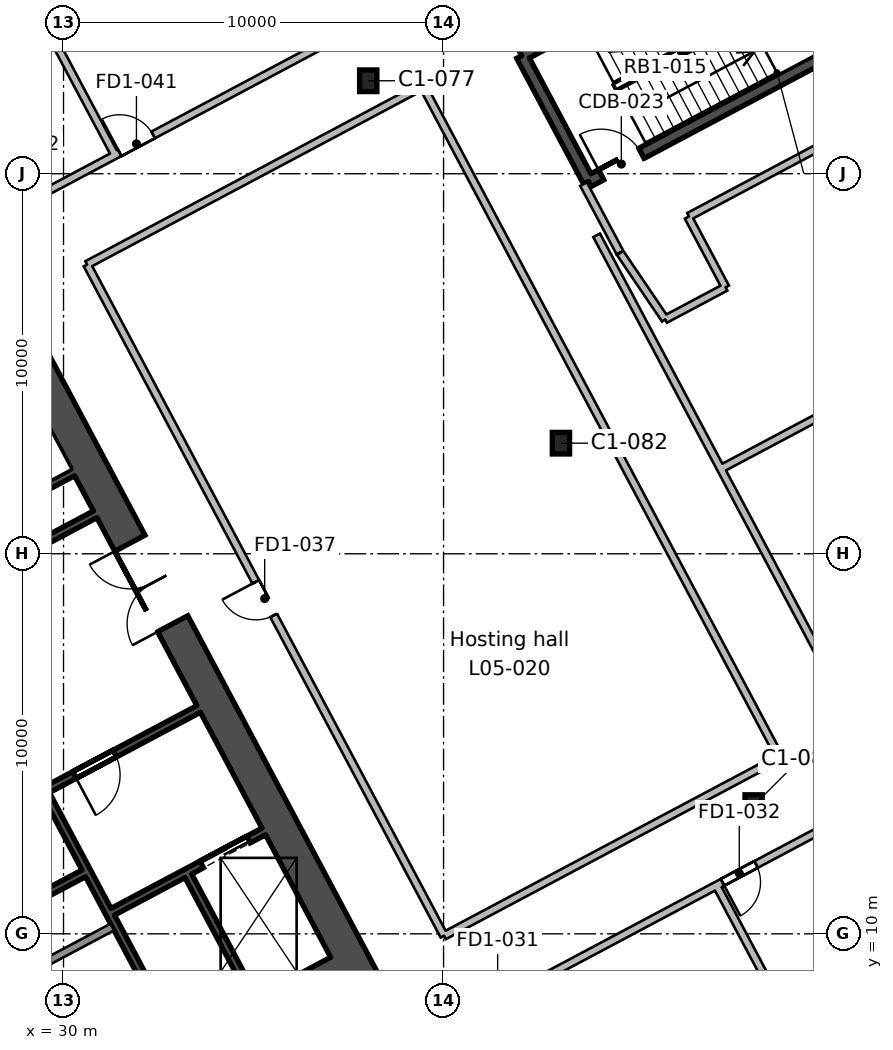
"""IFC4 building model, lengths in metres.
Left out: names, types, materials, properties, quantities, classifications, styles, units other than length and angle.
Written with IfcOpenShell. Run it as: python <this file> out.ifc"""

import sys

from ifc_helpers import new_model, si_unit, direction, frame, frame_2d, origin, origin_2d, place, context, subcontext, project, spatial, rectangle, i_section, extrude, element, fill, save


model = new_model("IFC4")
c1 = context("Model", 3, precision=1e-05, world=origin(), true_north=direction((0.0, 1.0)))
c2 = subcontext(c1, "Body", "Model", "MODEL_VIEW")
j1 = project(units=[si_unit("LENGTHUNIT", "METRE"), si_unit("PLANEANGLEUNIT", "RADIAN")], contexts=[c1])
p1 = place(None, origin())
s1 = spatial("IfcSite", under=j1, at=p1, CompositionType="ELEMENT")
p2 = place(p1, origin())
s2 = spatial("IfcBuilding", under=s1, at=p2, CompositionType="ELEMENT")
p3 = place(p2, frame((0.0, 0.0, 28.4)))
s3 = spatial("IfcBuildingStorey", under=s2, at=p3, CompositionType="ELEMENT", Elevation=28.4)
for number, where, z_axis, x_axis in (
    (1, (48.158, 13.374, 0.0), (0.0, 0.0, 1.0), (1.0, 0.0, 0.0)),
    (2, (43.088, 22.91, 0.0), (0.0, 0.0, 1.0), (1.0, 0.0, 0.0)),
    (3, (38.018, 32.446, 0.0), (0.0, 0.0, 1.0), (1.0, 0.0, 0.0)),
):
    element("IfcColumn", number, at=place(p3, frame(where, z_axis=z_axis, x_axis=x_axis)), inside=s3, PredefinedType="COLUMN", context=c2, shape_type="SweptSolid", body=[
        extrude(i_section(OverallWidth=0.455, OverallDepth=0.569, WebThickness=0.078, FlangeThickness=0.125, FilletRadius=0.015, at=origin_2d()), origin(), (0.0, 0.0, 1.0), 5.4),
    ])
p4 = place(p3, frame((37.849, 8.799, 0.0), z_axis=(0.0, 0.0, 1.0), x_axis=(-0.469465789982, 0.882950662289, 0.0)))
e4 = element("IfcWall", 4, at=p4, inside=s3, PredefinedType="SHEAR", context=c2, shape_type="SweptSolid", body=[
    extrude(rectangle(XDim=20.0, YDim=0.9, at=frame_2d((10.0, 0.0))), origin(), (0.0, 0.0, 1.0), 5.4),
])
p5 = place(p4, frame((10.6, 0.0, 0.0)))
e5 = element("IfcOpeningElement", 5, at=p5, cuts=e4, PredefinedType="OPENING", context=c2, shape_type="SweptSolid", body=[
    extrude(rectangle(XDim=2.4, YDim=2.4, at=frame_2d((1.2, 1.2))), frame((0.0, 0.46, 0.0), z_axis=(0.0, -1.0, 0.0), x_axis=(1.0, 0.0, 0.0)), (0.0, 0.0, 1.0), 0.92),
])
p6 = place(p3, frame((19.405, -0.498, 0.0), z_axis=(0.0, 0.0, 1.0), x_axis=(0.88294509198, 0.469476266226, 0.0)))
e6 = element("IfcWall", 6, at=p6, inside=s3, PredefinedType="SHEAR", context=c2, shape_type="SweptSolid", body=[
    extrude(rectangle(XDim=20.2, YDim=0.9, at=frame_2d((10.1, 0.0))), origin(), (0.0, 0.0, 1.0), 5.4),
])
p7 = place(p3, frame((32.968, 7.223, 0.0), z_axis=(0.0, 0.0, 1.0), x_axis=(-0.469480409012, 0.88294288918, 0.0)))
e7 = element("IfcWall", 7, at=p7, inside=s3, PredefinedType="SHEAR", context=c2, shape_type="SweptSolid", body=[
    extrude(rectangle(XDim=7.3, YDim=0.2, at=frame_2d((3.65, 0.0))), origin(), (0.0, 0.0, 1.0), 5.4),
])
p8 = place(p3, frame((34.999, 8.303, 0.0), z_axis=(0.0, 0.0, 1.0), x_axis=(-0.4694665462, 0.882950260207, 0.0)))
e8 = element("IfcWall", 8, at=p8, inside=s3, PredefinedType="SHEAR", context=c2, shape_type="SweptSolid", body=[
    extrude(rectangle(XDim=3.65, YDim=0.2, at=frame_2d((1.825, 0.0))), origin(), (0.0, 0.0, 1.0), 5.4),
])
p9 = place(p3, frame((26.692, 7.737, 0.0), z_axis=(0.0, 0.0, 1.0), x_axis=(0.882953967957, 0.469459572775, 0.0)))
e9 = element("IfcWall", 9, at=p9, inside=s3, PredefinedType="SOLIDWALL", context=c2, shape_type="SweptSolid", body=[
    extrude(rectangle(XDim=5.2, YDim=0.2, at=frame_2d((2.6, 0.0))), origin(), (0.0, 0.0, 1.0), 5.4),
])
p10 = place(p3, frame((31.296, 10.581, 0.0), z_axis=(0.0, 0.0, 1.0), x_axis=(0.882960433586, 0.469447412093, 0.0)))
e10 = element("IfcWall", 10, at=p10, inside=s3, PredefinedType="SHEAR", context=c2, shape_type="SweptSolid", body=[
    extrude(rectangle(XDim=4.5, YDim=0.2, at=frame_2d((2.25, 0.0))), origin(), (0.0, 0.0, 1.0), 5.4),
])
p11 = place(p10, frame((2.65, 0.0, 0.0)))
e11 = element("IfcOpeningElement", 11, at=p11, cuts=e10, PredefinedType="OPENING", context=c2, shape_type="SweptSolid", body=[
    extrude(rectangle(XDim=1.4, YDim=2.4, at=frame_2d((0.7, 1.2))), frame((0.0, 0.11, 0.0), z_axis=(0.0, -1.0, 0.0), x_axis=(1.0, 0.0, 0.0)), (0.0, 0.0, 1.0), 0.22),
])
p12 = place(p3, frame((25.941, 9.15, 0.0), z_axis=(0.0, 0.0, 1.0), x_axis=(0.882953967957, 0.469459572775, 0.0)))
e12 = element("IfcWall", 12, at=p12, inside=s3, PredefinedType="SHEAR", context=c2, shape_type="SweptSolid", body=[
    extrude(rectangle(XDim=5.2, YDim=0.2, at=frame_2d((2.6, 0.0))), origin(), (0.0, 0.0, 1.0), 5.4),
])
p13 = place(p3, frame((24.726, 11.222, 0.0), z_axis=(0.0, 0.0, 1.0), x_axis=(0.882940221191, 0.469485426614, 0.0)))
e13 = element("IfcWall", 13, at=p13, inside=s3, PredefinedType="SHEAR", context=c2, shape_type="SweptSolid", body=[
    extrude(rectangle(XDim=10.0, YDim=0.2, at=frame_2d((5.0, 0.0))), origin(), (0.0, 0.0, 1.0), 5.4),
])
p14 = place(p13, frame((6.3, 0.0, 0.0)))
e14 = element("IfcOpeningElement", 14, at=p14, cuts=e13, PredefinedType="OPENING", context=c2, shape_type="SweptSolid", body=[
    extrude(rectangle(XDim=1.2, YDim=2.1, at=frame_2d((0.6, 1.05))), frame((0.0, 0.11, 0.0), z_axis=(0.0, -1.0, 0.0), x_axis=(1.0, 0.0, 0.0)), (0.0, 0.0, 1.0), 0.22),
])
p15 = place(p13, frame((2.25, 0.0, 0.0)))
e15 = element("IfcOpeningElement", 15, at=p15, cuts=e13, PredefinedType="OPENING", context=c2, shape_type="SweptSolid", body=[
    extrude(rectangle(XDim=0.9, YDim=2.1, at=frame_2d((0.45, 1.05))), frame((0.0, 0.11, 0.0), z_axis=(0.0, -1.0, 0.0), x_axis=(1.0, 0.0, 0.0)), (0.0, 0.0, 1.0), 0.22),
])
p16 = place(p3, frame((23.769, 17.282, 0.0), z_axis=(0.0, 0.0, 1.0), x_axis=(0.882940221191, 0.469485426614, 0.0)))
e16 = element("IfcWall", 16, at=p16, inside=s3, PredefinedType="SHEAR", context=c2, shape_type="SweptSolid", body=[
    extrude(rectangle(XDim=8.0, YDim=0.2, at=frame_2d((4.0, 0.0))), origin(), (0.0, 0.0, 1.0), 5.4),
])
p17 = place(p3, frame((23.182, 18.385, 0.0), z_axis=(0.0, 0.0, 1.0), x_axis=(0.88295287151, 0.469461634952, 0.0)))
e17 = element("IfcWall", 17, at=p17, inside=s3, PredefinedType="SHEAR", context=c2, shape_type="SweptSolid", body=[
    extrude(rectangle(XDim=8.0, YDim=0.2, at=frame_2d((4.0, 0.0))), origin(), (0.0, 0.0, 1.0), 5.4),
])
p18 = place(p3, frame((51.145, 33.693, 0.0), z_axis=(0.0, 0.0, 1.0), x_axis=(-0.882945809314, -0.469474917132, 0.0)))
e18 = element("IfcWall", 18, at=p18, inside=s3, PredefinedType="SHEAR", context=c2, shape_type="SweptSolid", body=[
    extrude(rectangle(XDim=8.3, YDim=0.3, at=frame_2d((4.15, 0.0))), origin(), (0.0, 0.0, 1.0), 5.4),
])
p19 = place(p18, frame((6.725, 0.0, 0.0)))
e19 = element("IfcOpeningElement", 19, at=p19, cuts=e18, PredefinedType="OPENING", context=c2, shape_type="SweptSolid", body=[
    extrude(rectangle(XDim=1.2, YDim=2.1, at=frame_2d((0.6, 1.05))), frame((0.0, 0.16, 0.0), z_axis=(0.0, -1.0, 0.0), x_axis=(1.0, 0.0, 0.0)), (0.0, 0.0, 1.0), 0.32),
])
p20 = place(p3, frame((43.816, 29.796, 0.0), z_axis=(0.0, 0.0, 1.0), x_axis=(-0.46946936446, 0.882948761726, 0.0)))
e20 = element("IfcWall", 20, at=p20, inside=s3, PredefinedType="SHEAR", context=c2, shape_type="SweptSolid", body=[
    extrude(rectangle(XDim=3.75, YDim=0.3, at=frame_2d((1.875, 0.0))), origin(), (0.0, 0.0, 1.0), 5.4),
])
p21 = place(p3, frame((42.055, 33.107, 0.0), z_axis=(0.0, 0.0, 1.0), x_axis=(0.882945809314, 0.469474917132, 0.0)))
e21 = element("IfcWall", 21, at=p21, inside=s3, PredefinedType="SHEAR", context=c2, shape_type="SweptSolid", body=[
    extrude(rectangle(XDim=8.3, YDim=0.3, at=frame_2d((4.15, 0.0))), origin(), (0.0, 0.0, 1.0), 5.4),
])
p22 = place(p3, frame((0.0, 13.815, 0.0), z_axis=(0.0, 0.0, 1.0), x_axis=(0.882946053005, 0.469474458819, 0.0)))
e22 = element("IfcWall", 22, at=p22, inside=s3, PredefinedType="PARTITIONING", context=c2, shape_type="SweptSolid", body=[
    extrude(rectangle(XDim=65.714, YDim=0.2, at=frame_2d((32.857, 0.0))), origin(), (0.0, 0.0, 1.0), 4.95),
])
p23 = place(p22, frame((35.65, 0.0, 0.0)))
e23 = element("IfcOpeningElement", 23, at=p23, cuts=e22, PredefinedType="OPENING", context=c2, shape_type="SweptSolid", body=[
    extrude(rectangle(XDim=1.0, YDim=2.1, at=frame_2d((0.5, 1.05))), frame((0.0, 0.11, 0.0), z_axis=(0.0, -1.0, 0.0), x_axis=(1.0, 0.0, 0.0)), (0.0, 0.0, 1.0), 0.22),
])
p24 = place(p22, frame((32.15, 0.0, 0.0)))
e24 = element("IfcOpeningElement", 24, at=p24, cuts=e22, PredefinedType="OPENING", context=c2, shape_type="SweptSolid", body=[
    extrude(rectangle(XDim=1.0, YDim=2.1, at=frame_2d((0.5, 1.05))), frame((0.0, 0.11, 0.0), z_axis=(0.0, -1.0, 0.0), x_axis=(1.0, 0.0, 0.0)), (0.0, 0.0, 1.0), 0.22),
])
p25 = place(p22, frame((19.25, 0.0, 0.0)))
e25 = element("IfcOpeningElement", 25, at=p25, cuts=e22, PredefinedType="OPENING", context=c2, shape_type="SweptSolid", body=[
    extrude(rectangle(XDim=1.0, YDim=2.1, at=frame_2d((0.5, 1.05))), frame((0.0, 0.11, 0.0), z_axis=(0.0, -1.0, 0.0), x_axis=(1.0, 0.0, 0.0)), (0.0, 0.0, 1.0), 0.22),
])
p26 = place(p3, frame((69.475, 23.126, 0.0), z_axis=(0.0, 0.0, 1.0), x_axis=(-0.882944287046, -0.469477780063, 0.0)))
e26 = element("IfcWall", 26, at=p26, inside=s3, PredefinedType="PARTITIONING", context=c2, shape_type="SweptSolid", body=[
    extrude(rectangle(XDim=63.285, YDim=0.2, at=frame_2d((31.643, 0.0))), origin(), (0.0, 0.0, 1.0), 4.95),
])
p27 = place(p26, frame((47.47, 0.0, 0.0)))
e27 = element("IfcOpeningElement", 27, at=p27, cuts=e26, PredefinedType="OPENING", context=c2, shape_type="SweptSolid", body=[
    extrude(rectangle(XDim=1.0, YDim=2.1, at=frame_2d((0.5, 1.05))), frame((0.0, 0.11, 0.0), z_axis=(0.0, -1.0, 0.0), x_axis=(1.0, 0.0, 0.0)), (0.0, 0.0, 1.0), 0.22),
])
p28 = place(p26, frame((31.271, 0.0, 0.0)))
e28 = element("IfcOpeningElement", 28, at=p28, cuts=e26, PredefinedType="OPENING", context=c2, shape_type="SweptSolid", body=[
    extrude(rectangle(XDim=1.0, YDim=2.1, at=frame_2d((0.5, 1.05))), frame((0.0, 0.11, 0.0), z_axis=(0.0, -1.0, 0.0), x_axis=(1.0, 0.0, 0.0)), (0.0, 0.0, 1.0), 0.22),
])
p29 = place(p26, frame((24.07, 0.0, 0.0)))
e29 = element("IfcOpeningElement", 29, at=p29, cuts=e26, PredefinedType="OPENING", context=c2, shape_type="SweptSolid", body=[
    extrude(rectangle(XDim=1.0, YDim=2.1, at=frame_2d((0.5, 1.05))), frame((0.0, 0.11, 0.0), z_axis=(0.0, -1.0, 0.0), x_axis=(1.0, 0.0, 0.0)), (0.0, 0.0, 1.0), 0.22),
])
p30 = place(p26, frame((11.071, 0.0, 0.0)))
e30 = element("IfcOpeningElement", 30, at=p30, cuts=e26, PredefinedType="OPENING", context=c2, shape_type="SweptSolid", body=[
    extrude(rectangle(XDim=1.0, YDim=2.1, at=frame_2d((0.5, 1.05))), frame((0.0, 0.11, 0.0), z_axis=(0.0, -1.0, 0.0), x_axis=(1.0, 0.0, 0.0)), (0.0, 0.0, 1.0), 0.22),
])
p31 = place(p3, frame((30.307, 32.462, 0.0), z_axis=(0.0, 0.0, 1.0), x_axis=(0.469652813312, -0.882851196379, 0.0)))
e31 = element("IfcWall", 31, at=p31, inside=s3, PredefinedType="PARTITIONING", context=c2, shape_type="SweptSolid", body=[
    extrude(rectangle(XDim=2.236, YDim=0.2, at=frame_2d((1.118, 0.0))), origin(), (0.0, 0.0, 1.0), 4.95),
])
p32 = place(p3, frame((30.307, 32.462, 0.0), z_axis=(0.0, 0.0, 1.0), x_axis=(-0.469337071246, 0.883019090141, 0.0)))
e32 = element("IfcWall", 32, at=p32, inside=s3, PredefinedType="PARTITIONING", context=c2, shape_type="SweptSolid", body=[
    extrude(rectangle(XDim=3.566, YDim=0.2, at=frame_2d((1.783, 0.0))), origin(), (0.0, 0.0, 1.0), 4.95),
])
p33 = place(p3, frame((47.183, 11.272, 0.0), z_axis=(0.0, 0.0, 1.0), x_axis=(0.469454635748, -0.882956592916, 0.0)))
e33 = element("IfcWall", 33, at=p33, inside=s3, PredefinedType="PARTITIONING", context=c2, shape_type="SweptSolid", body=[
    extrude(rectangle(XDim=9.001, YDim=0.2, at=frame_2d((4.501, 0.0))), origin(), (0.0, 0.0, 1.0), 4.95),
])
p34 = place(p3, frame((44.028, 28.38, 0.0), z_axis=(0.0, 0.0, 1.0), x_axis=(0.469474817112, -0.882945862495, 0.0)))
e34 = element("IfcWall", 34, at=p34, inside=s3, PredefinedType="PARTITIONING", context=c2, shape_type="SweptSolid", body=[
    extrude(rectangle(XDim=14.39, YDim=0.2, at=frame_2d((7.195, 0.0))), origin(), (0.0, 0.0, 1.0), 4.95),
])
p35 = place(p3, frame((64.956, 31.625, 0.0), z_axis=(0.0, 0.0, 1.0), x_axis=(-0.882962064064, -0.469444345396, 0.0)))
e35 = element("IfcWall", 35, at=p35, inside=s3, PredefinedType="PARTITIONING", context=c2, shape_type="SweptSolid", body=[
    extrude(rectangle(XDim=20.002, YDim=0.2, at=frame_2d((10.001, 0.0))), origin(), (0.0, 0.0, 1.0), 4.95),
])
p36 = place(p3, frame((44.641, 27.925, 0.0), z_axis=(0.0, 0.0, 1.0), x_axis=(-0.469289400299, 0.88304442627, 0.0)))
e36 = element("IfcWall", 36, at=p36, inside=s3, PredefinedType="PARTITIONING", context=c2, shape_type="SweptSolid", body=[
    extrude(rectangle(XDim=2.04, YDim=0.2, at=frame_2d((1.02, 0.0))), origin(), (0.0, 0.0, 1.0), 4.95),
])
p37 = place(p3, frame((46.436, 28.863, 0.0), z_axis=(0.0, 0.0, 1.0), x_axis=(0.469342548312, -0.883016178982, 0.0)))
e37 = element("IfcWall", 37, at=p37, inside=s3, PredefinedType="PARTITIONING", context=c2, shape_type="SweptSolid", body=[
    extrude(rectangle(XDim=2.096, YDim=0.2, at=frame_2d((1.048, 0.0))), origin(), (0.0, 0.0, 1.0), 4.95),
])
p38 = place(p3, frame((47.42, 27.012, 0.0), z_axis=(0.0, 0.0, 1.0), x_axis=(-0.882911879422, -0.469538723829, 0.0)))
e38 = element("IfcWall", 38, at=p38, inside=s3, PredefinedType="PARTITIONING", context=c2, shape_type="SweptSolid", body=[
    extrude(rectangle(XDim=1.8, YDim=0.2, at=frame_2d((0.9, 0.0))), origin(), (0.0, 0.0, 1.0), 4.95),
])
p39 = place(p3, frame((45.831, 26.167, 0.0), z_axis=(0.0, 0.0, 1.0), x_axis=(-0.560924797645, 0.827866759441, 0.0)))
e39 = element("IfcWall", 39, at=p39, inside=s3, PredefinedType="PARTITIONING", context=c2, shape_type="SweptSolid", body=[
    extrude(rectangle(XDim=2.113, YDim=0.2, at=frame_2d((1.056, 0.0))), origin(), (0.0, 0.0, 1.0), 4.95),
])
p40 = place(p3, frame((52.239, 31.953, 0.0), z_axis=(0.0, 0.0, 1.0), x_axis=(-0.882908561856, -0.469544962065, 0.0)))
e40 = element("IfcWall", 40, at=p40, inside=s3, PredefinedType="PARTITIONING", context=c2, shape_type="SweptSolid", body=[
    extrude(rectangle(XDim=6.549, YDim=0.2, at=frame_2d((3.274, 0.0))), origin(), (0.0, 0.0, 1.0), 4.95),
])
p41 = place(p3, frame((30.62, 27.609, 0.0), z_axis=(0.0, 0.0, 1.0), x_axis=(0.882924481944, 0.469515025515, 0.0)))
e41 = element("IfcWall", 41, at=p41, inside=s3, PredefinedType="PARTITIONING", context=c2, shape_type="SweptSolid", body=[
    extrude(rectangle(XDim=10.004, YDim=0.2, at=frame_2d((5.002, 0.0))), origin(), (0.0, 0.0, 1.0), 4.95),
])
p42 = place(p3, frame((39.453, 32.306, 0.0), z_axis=(0.0, 0.0, 1.0), x_axis=(0.469494565876, -0.882935361514, 0.0)))
e42 = element("IfcWall", 42, at=p42, inside=s3, PredefinedType="PARTITIONING", context=c2, shape_type="SweptSolid", body=[
    extrude(rectangle(XDim=20.005, YDim=0.2, at=frame_2d((10.002, 0.0))), origin(), (0.0, 0.0, 1.0), 4.95),
])
p43 = place(p3, frame((48.845, 14.643, 0.0), z_axis=(0.0, 0.0, 1.0), x_axis=(-0.882970325556, -0.469428806304, 0.0)))
e43 = element("IfcWall", 43, at=p43, inside=s3, PredefinedType="PARTITIONING", context=c2, shape_type="SweptSolid", body=[
    extrude(rectangle(XDim=10.004, YDim=0.2, at=frame_2d((5.002, 0.0))), origin(), (0.0, 0.0, 1.0), 4.95),
])
p44 = place(p3, frame((40.012, 9.947, 0.0), z_axis=(0.0, 0.0, 1.0), x_axis=(-0.469505288447, 0.882929659781, 0.0)))
e44 = element("IfcWall", 44, at=p44, inside=s3, PredefinedType="PARTITIONING", context=c2, shape_type="SweptSolid", body=[
    extrude(rectangle(XDim=20.004, YDim=0.2, at=frame_2d((10.002, 0.0))), origin(), (0.0, 0.0, 1.0), 4.95),
])
p45 = place(p44, frame((9.55, 0.0, 0.0)))
e45 = element("IfcOpeningElement", 45, at=p45, cuts=e44, PredefinedType="OPENING", context=c2, shape_type="SweptSolid", body=[
    extrude(rectangle(XDim=1.0, YDim=2.1, at=frame_2d((0.5, 1.05))), frame((0.0, 0.11, 0.0), z_axis=(0.0, -1.0, 0.0), x_axis=(1.0, 0.0, 0.0)), (0.0, 0.0, 1.0), 0.22),
])
p46 = place(p5, origin())
e46 = element("IfcDoor", 46, at=p46, inside=s3, OperationType="DOUBLE_DOOR_SINGLE_SWING", PredefinedType="DOOR", context=c2, shape_type="SweptSolid", body=[
    extrude(rectangle(XDim=2.4, YDim=2.4, at=frame_2d((1.2, 1.2))), frame((0.0, 0.025, 0.0), z_axis=(0.0, -1.0, 0.0), x_axis=(1.0, 0.0, 0.0)), (0.0, 0.0, 1.0), 0.05),
])
fill(e5, e46)
p47 = place(p14, frame((1.2, 0.0, 0.0), z_axis=(0.0, 0.0, 1.0), x_axis=(-1.0, 0.0, 0.0)))
e47 = element("IfcDoor", 47, at=p47, inside=s3, OperationType="SINGLE_SWING_RIGHT", PredefinedType="DOOR", context=c2, shape_type="SweptSolid", body=[
    extrude(rectangle(XDim=1.2, YDim=2.1, at=frame_2d((0.6, 1.05))), frame((0.0, 0.025, 0.0), z_axis=(0.0, -1.0, 0.0), x_axis=(1.0, 0.0, 0.0)), (0.0, 0.0, 1.0), 0.05),
])
fill(e14, e47)
p48 = place(p11, origin())
e48 = element("IfcDoor", 48, at=p48, inside=s3, OperationType="DOUBLE_DOOR_SLIDING", PredefinedType="DOOR", context=c2, shape_type="SweptSolid", body=[
    extrude(rectangle(XDim=1.4, YDim=2.4, at=frame_2d((0.7, 1.2))), frame((0.0, 0.025, 0.0), z_axis=(0.0, -1.0, 0.0), x_axis=(1.0, 0.0, 0.0)), (0.0, 0.0, 1.0), 0.05),
])
fill(e11, e48)
p49 = place(p19, frame((1.2, 0.0, 0.0), z_axis=(0.0, 0.0, 1.0), x_axis=(-1.0, 0.0, 0.0)))
e49 = element("IfcDoor", 49, at=p49, inside=s3, OperationType="SINGLE_SWING_LEFT", PredefinedType="DOOR", context=c2, shape_type="SweptSolid", body=[
    extrude(rectangle(XDim=1.2, YDim=2.1, at=frame_2d((0.6, 1.05))), frame((0.0, 0.025, 0.0), z_axis=(0.0, -1.0, 0.0), x_axis=(1.0, 0.0, 0.0)), (0.0, 0.0, 1.0), 0.05),
])
fill(e19, e49)
p50 = place(p23, origin())
e50 = element("IfcDoor", 50, at=p50, inside=s3, OperationType="SINGLE_SWING_LEFT", PredefinedType="DOOR", context=c2, shape_type="SweptSolid", body=[
    extrude(rectangle(XDim=1.0, YDim=2.1, at=frame_2d((0.5, 1.05))), frame((0.0, 0.025, 0.0), z_axis=(0.0, -1.0, 0.0), x_axis=(1.0, 0.0, 0.0)), (0.0, 0.0, 1.0), 0.05),
])
fill(e23, e50)
p51 = place(p29, origin())
e51 = element("IfcDoor", 51, at=p51, inside=s3, OperationType="SINGLE_SWING_RIGHT", PredefinedType="DOOR", context=c2, shape_type="SweptSolid", body=[
    extrude(rectangle(XDim=1.0, YDim=2.1, at=frame_2d((0.5, 1.05))), frame((0.0, 0.025, 0.0), z_axis=(0.0, -1.0, 0.0), x_axis=(1.0, 0.0, 0.0)), (0.0, 0.0, 1.0), 0.05),
])
fill(e29, e51)
p52 = place(p45, origin())
e52 = element("IfcDoor", 52, at=p52, inside=s3, OperationType="SINGLE_SWING_RIGHT", PredefinedType="DOOR", context=c2, shape_type="SweptSolid", body=[
    extrude(rectangle(XDim=1.0, YDim=2.1, at=frame_2d((0.5, 1.05))), frame((0.0, 0.025, 0.0), z_axis=(0.0, -1.0, 0.0), x_axis=(1.0, 0.0, 0.0)), (0.0, 0.0, 1.0), 0.05),
])
fill(e45, e52)
save(model, sys.argv[1])
